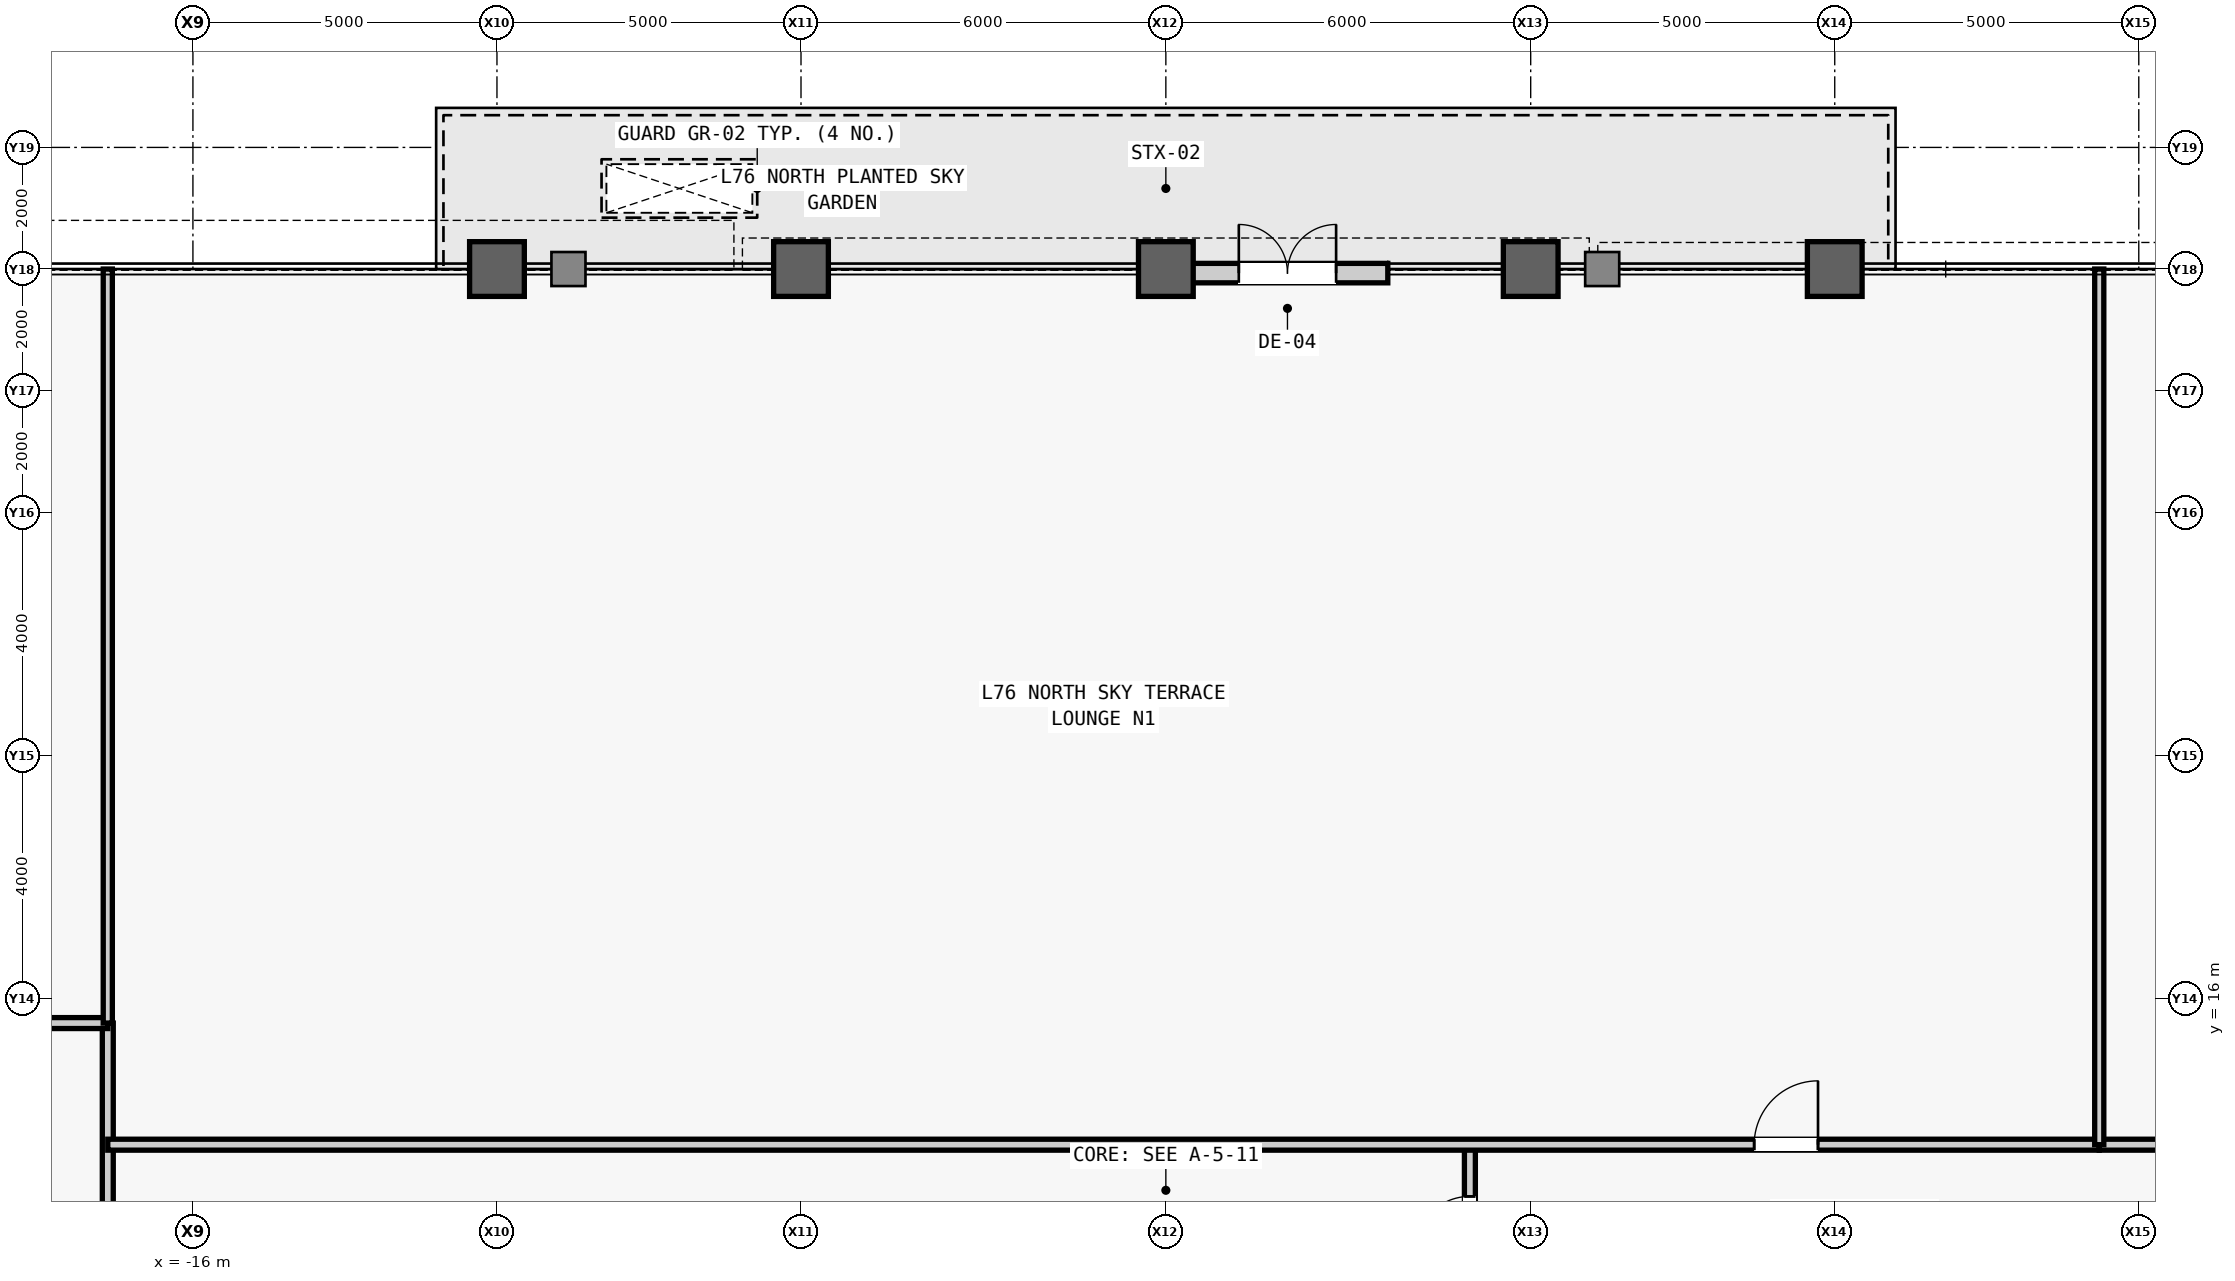
"""IFC4 building model, lengths in metres.
Left out: names, types, materials, properties, quantities, classifications, styles, units other than length and angle.
Written with IfcOpenShell. Run it as: python <this file> out.ifc"""

import sys

from ifc_helpers import new_model, si_unit, direction, frame, frame_2d, origin, origin_2d, place, context, subcontext, project, spatial, rectangle, hollow_rectangle, extrude, source, transform, mapped, element, fill, save


model = new_model("IFC4")
c1 = context("Model", 3, precision=1e-05, world=origin(), true_north=direction((0.0, 1.0)))
c2 = subcontext(c1, "Body", "Model", "MODEL_VIEW")
j1 = project(units=[si_unit("LENGTHUNIT", "METRE"), si_unit("PLANEANGLEUNIT", "RADIAN")], contexts=[c1])
p1 = place(None, origin())
s1 = spatial("IfcSite", under=j1, at=p1, CompositionType="ELEMENT")
p2 = place(p1, origin())
s2 = spatial("IfcBuilding", under=s1, at=p2, CompositionType="ELEMENT")
p3 = place(p2, frame((0.0, 0.0, 321.5)))
s3 = spatial("IfcBuildingStorey", under=s2, at=p3, CompositionType="ELEMENT", Elevation=321.5)
m1 = source(origin(), c2, "Body", "SweptSolid", [
    extrude(hollow_rectangle(XDim=0.9, YDim=0.9, WallThickness=0.05, at=origin_2d()), origin(), (0.0, 0.0, 1.0), 4.8),
])
for number, where, z_axis, x_axis in (
    (1, (-11.0, 28.0, 0.0), (0.0, 0.0, 1.0), (1.0, 0.0, 0.0)),
    (2, (-6.0, 28.0, 0.0), (0.0, 0.0, 1.0), (1.0, 0.0, 0.0)),
    (3, (0.0, 28.0, 0.0), (0.0, 0.0, 1.0), (1.0, 0.0, 0.0)),
    (4, (6.0, 28.0, 0.0), (0.0, 0.0, 1.0), (1.0, 0.0, 0.0)),
    (5, (11.0, 28.0, 0.0), (0.0, 0.0, 1.0), (1.0, 0.0, 0.0)),
):
    element("IfcColumn", number, at=place(p3, frame(where, z_axis=z_axis, x_axis=x_axis)), inside=s3, PredefinedType="COLUMN", context=c2, shape_type="MappedRepresentation", body=[
        mapped(m1, transform((0.0, 0.0, 0.0), scale=1.0)),
    ])
m2 = source(origin(), c2, "Body", "SweptSolid", [
    extrude(rectangle(XDim=3.3, YDim=0.32, at=frame_2d((1.65, 0.0))), origin(), (0.0, 0.0, 1.0), 3.951),
])
p4 = place(p3, frame((0.35, 27.933, 0.0), z_axis=(0.0, 0.0, 1.0), x_axis=(1.0, 0.0, 0.0)))
e6 = element("IfcWall", 6, at=p4, inside=s3, PredefinedType="STANDARD", context=c2, shape_type="MappedRepresentation", body=[
    mapped(m2, transform((0.0, 0.0, 0.0), scale=1.0)),
])
m3 = source(origin(), c2, "Body", "SweptSolid", [
    extrude(rectangle(XDim=1.6, YDim=2.25, at=frame_2d((0.8, 1.125))), frame((0.0, 0.17, 0.0), z_axis=(0.0, -1.0, 0.0), x_axis=(1.0, 0.0, 0.0)), (0.0, 0.0, 1.0), 0.34),
])
p5 = place(p4, frame((0.85, 0.0, 0.0)))
e7 = element("IfcOpeningElement", 7, at=p5, cuts=e6, PredefinedType="OPENING", context=c2, shape_type="MappedRepresentation", body=[
    mapped(m3, transform((0.0, 0.0, 0.0), scale=1.0)),
])
m4 = source(origin(), c2, "Body", "SweptSolid", [
    extrude(rectangle(XDim=8.4, YDim=0.18, at=frame_2d((4.2, 0.0))), origin(), (0.0, 0.0, 1.0), 4.54),
])
p6 = place(p3, frame((-17.4, 7.2, 0.0), z_axis=(0.0, 0.0, 1.0), x_axis=(0.0, 1.0, 0.0)))
e8 = element("IfcWall", 8, at=p6, inside=s3, PredefinedType="PARTITIONING", context=c2, shape_type="MappedRepresentation", body=[
    mapped(m4, transform((0.0, 0.0, 0.0), scale=1.0)),
])
m5 = source(origin(), c2, "Body", "SweptSolid", [
    extrude(rectangle(XDim=2.6, YDim=0.18, at=frame_2d((1.3, 0.0))), origin(), (0.0, 0.0, 1.0), 4.54),
])
p7 = place(p3, frame((5.0, 11.0, 0.0), z_axis=(0.0, 0.0, 1.0), x_axis=(0.0, 1.0, 0.0)))
e9 = element("IfcWall", 9, at=p7, inside=s3, PredefinedType="PARTITIONING", context=c2, shape_type="MappedRepresentation", body=[
    mapped(m5, transform((0.0, 0.0, 0.0), scale=1.0)),
])
m6 = source(origin(), c2, "Body", "SweptSolid", [
    extrude(rectangle(XDim=0.9, YDim=2.15, at=frame_2d((0.45, 1.075))), frame((0.0, 0.1, 0.0), z_axis=(0.0, -1.0, 0.0), x_axis=(1.0, 0.0, 0.0)), (0.0, 0.0, 1.0), 0.2),
])
p8 = place(p7, frame((0.85, 0.0, 0.0)))
e10 = element("IfcOpeningElement", 10, at=p8, cuts=e9, PredefinedType="OPENING", context=c2, shape_type="MappedRepresentation", body=[
    mapped(m6, transform((0.0, 0.0, 0.0), scale=1.0)),
])
m7 = source(origin(), c2, "Body", "SweptSolid", [
    extrude(rectangle(XDim=2.4, YDim=0.18, at=frame_2d((1.2, 0.0))), origin(), (0.0, 0.0, 1.0), 4.54),
])
p9 = place(p3, frame((-19.8, 15.6, 0.0), z_axis=(0.0, 0.0, 1.0), x_axis=(1.0, 0.0, 0.0)))
e11 = element("IfcWall", 11, at=p9, inside=s3, PredefinedType="PARTITIONING", context=c2, shape_type="MappedRepresentation", body=[
    mapped(m7, transform((0.0, 0.0, 0.0), scale=1.0)),
])
m8 = source(origin(), c2, "Body", "SweptSolid", [
    extrude(rectangle(XDim=2.4, YDim=0.18, at=frame_2d((1.2, 0.0))), origin(), (0.0, 0.0, 1.0), 4.54),
])
p10 = place(p3, frame((15.35, 13.6, 0.0), z_axis=(0.0, 0.0, 1.0), x_axis=(1.0, 0.0, 0.0)))
e12 = element("IfcWall", 12, at=p10, inside=s3, PredefinedType="PARTITIONING", context=c2, shape_type="MappedRepresentation", body=[
    mapped(m8, transform((0.0, 0.0, 0.0), scale=1.0)),
])
m9 = source(origin(), c2, "Body", "SweptSolid", [
    extrude(rectangle(XDim=32.75, YDim=0.18, at=frame_2d((16.375, 0.0))), origin(), (0.0, 0.0, 1.0), 4.54),
])
p11 = place(p3, frame((-17.4, 13.6, 0.0), z_axis=(0.0, 0.0, 1.0), x_axis=(1.0, 0.0, 0.0)))
e13 = element("IfcWall", 13, at=p11, inside=s3, PredefinedType="PARTITIONING", context=c2, shape_type="MappedRepresentation", body=[
    mapped(m9, transform((0.0, 0.0, 0.0), scale=1.0)),
])
m10 = source(origin(), c2, "Body", "SweptSolid", [
    extrude(rectangle(XDim=1.05, YDim=2.2, at=frame_2d((0.525, 1.1))), frame((0.0, 0.1, 0.0), z_axis=(0.0, -1.0, 0.0), x_axis=(1.0, 0.0, 0.0)), (0.0, 0.0, 1.0), 0.2),
])
p12 = place(p11, frame((27.075, 0.0, 0.0)))
e14 = element("IfcOpeningElement", 14, at=p12, cuts=e13, PredefinedType="OPENING", context=c2, shape_type="MappedRepresentation", body=[
    mapped(m10, transform((0.0, 0.0, 0.0), scale=1.0)),
])
m11 = source(origin(), c2, "Body", "SweptSolid", [
    extrude(rectangle(XDim=12.4, YDim=0.15, at=frame_2d((6.2, 0.0))), origin(), (0.0, 0.0, 1.0), 4.54),
])
p13 = place(p3, frame((-17.4, 15.6, 0.0), z_axis=(0.0, 0.0, 1.0), x_axis=(0.0, 1.0, 0.0)))
e15 = element("IfcWall", 15, at=p13, inside=s3, PredefinedType="PARTITIONING", context=c2, shape_type="MappedRepresentation", body=[
    mapped(m11, transform((0.0, 0.0, 0.0), scale=1.0)),
])
m12 = source(origin(), c2, "Body", "SweptSolid", [
    extrude(rectangle(XDim=14.4, YDim=0.15, at=frame_2d((7.2, 0.0))), origin(), (0.0, 0.0, 1.0), 4.54),
])
p14 = place(p3, frame((15.35, 13.6, 0.0), z_axis=(0.0, 0.0, 1.0), x_axis=(0.0, 1.0, 0.0)))
e16 = element("IfcWall", 16, at=p14, inside=s3, PredefinedType="PARTITIONING", context=c2, shape_type="MappedRepresentation", body=[
    mapped(m12, transform((0.0, 0.0, 0.0), scale=1.0)),
])
m13 = source(origin(), c2, "Body", "SweptSolid", [
    extrude(rectangle(XDim=1.6, YDim=2.25, at=frame_2d((0.8, 1.125))), frame((0.0, 0.025, 0.0), z_axis=(0.0, -1.0, 0.0), x_axis=(1.0, 0.0, 0.0)), (0.0, 0.0, 1.0), 0.05),
])
p15 = place(p5, origin())
e17 = element("IfcDoor", 17, at=p15, inside=s3, OperationType="DOUBLE_DOOR_SINGLE_SWING", PredefinedType="DOOR", context=c2, shape_type="MappedRepresentation", body=[
    mapped(m13, transform((0.0, 0.0, 0.0), scale=1.0)),
])
fill(e7, e17)
m14 = source(origin(), c2, "Body", "SweptSolid", [
    extrude(rectangle(XDim=0.9, YDim=2.15, at=frame_2d((0.45, 1.075))), frame((0.0, 0.025, 0.0), z_axis=(0.0, -1.0, 0.0), x_axis=(1.0, 0.0, 0.0)), (0.0, 0.0, 1.0), 0.05),
])
p16 = place(p8, origin())
e18 = element("IfcDoor", 18, at=p16, inside=s3, OperationType="SINGLE_SWING_LEFT", PredefinedType="DOOR", context=c2, shape_type="MappedRepresentation", body=[
    mapped(m14, transform((0.0, 0.0, 0.0), scale=1.0)),
])
fill(e10, e18)
m15 = source(origin(), c2, "Body", "SweptSolid", [
    extrude(rectangle(XDim=1.05, YDim=2.2, at=frame_2d((0.525, 1.1))), frame((0.0, 0.025, 0.0), z_axis=(0.0, -1.0, 0.0), x_axis=(1.0, 0.0, 0.0)), (0.0, 0.0, 1.0), 0.05),
])
p17 = place(p12, origin())
e19 = element("IfcDoor", 19, at=p17, inside=s3, OperationType="SINGLE_SWING_RIGHT", PredefinedType="DOOR", context=c2, shape_type="MappedRepresentation", body=[
    mapped(m15, transform((0.0, 0.0, 0.0), scale=1.0)),
])
fill(e14, e19)
save(model, sys.argv[1])
